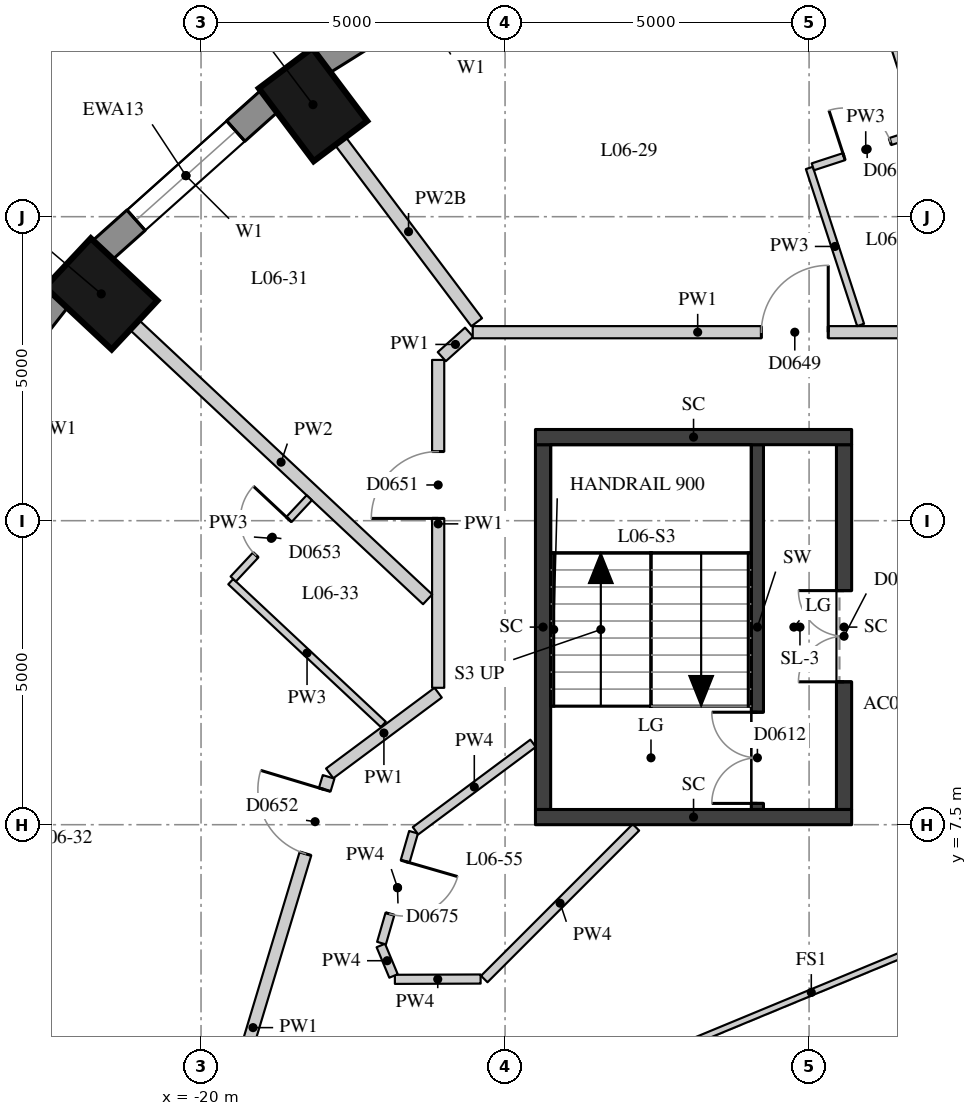
"""IFC4 building model, lengths in metres.
Left out: names, types, materials, properties, quantities, classifications, styles, units other than length and angle.
Written with IfcOpenShell. Run it as: python <this file> out.ifc"""

import sys

from ifc_helpers import new_model, si_unit, direction, frame, frame_2d, origin, origin_2d, place, context, subcontext, project, spatial, rectangle, extrude, element, fill, save


model = new_model("IFC4")
c1 = context("Model", 3, precision=1e-05, world=origin(), true_north=direction((0.0, 1.0)))
c2 = subcontext(c1, "Body", "Model", "MODEL_VIEW")
j1 = project(units=[si_unit("LENGTHUNIT", "METRE"), si_unit("PLANEANGLEUNIT", "RADIAN")], contexts=[c1])
p1 = place(None, origin())
s1 = spatial("IfcSite", under=j1, at=p1, CompositionType="ELEMENT")
p2 = place(p1, origin())
s2 = spatial("IfcBuilding", under=s1, at=p2, CompositionType="ELEMENT")
p3 = place(p2, frame((0.0, 0.0, 28.3)))
s3 = spatial("IfcBuildingStorey", under=s2, at=p3, CompositionType="ELEMENT", Elevation=28.3)
for number, where, z_axis, x_axis in (
    (1, (-18.159, 19.343, 0.0), (0.0, 0.0, 1.0), (-0.601, 0.799, 0.0)),
    (2, (-21.641, 16.23, 0.0), (0.0, 0.0, 1.0), (-0.73, 0.683, 0.0)),
):
    element("IfcColumn", number, at=place(p3, frame(where, z_axis=z_axis, x_axis=x_axis)), inside=s3, PredefinedType="COLUMN", context=c2, shape_type="SweptSolid", body=[
        extrude(rectangle(XDim=1.5, YDim=1.1, at=origin_2d()), origin(), (0.0, 0.0, 1.0), 3.3),
    ])
p4 = place(p3, frame((-14.817, 22.051, 0.0), z_axis=(0.0, 0.0, 1.0), x_axis=(-0.847635480093, -0.530579016629, 0.0)))
e3 = element("IfcWall", 3, at=p4, inside=s3, PredefinedType="SOLIDWALL", context=c2, shape_type="SweptSolid", body=[
    extrude(rectangle(XDim=3.782, YDim=0.45, at=frame_2d((1.891, 0.0))), origin(), (0.0, 0.0, 1.0), 3.02),
])
p5 = place(p4, frame((0.791, 0.0, 0.4)))
e4 = element("IfcOpeningElement", 4, at=p5, cuts=e3, PredefinedType="OPENING", context=c2, shape_type="SweptSolid", body=[
    extrude(rectangle(XDim=2.2, YDim=1.75, at=frame_2d((1.1, 0.875))), frame((0.0, 0.235, 0.0), z_axis=(0.0, -1.0, 0.0), x_axis=(1.0, 0.0, 0.0)), (0.0, 0.0, 1.0), 0.47),
])
p6 = place(p3, frame((-18.871, 19.407, 0.0), z_axis=(0.0, 0.0, 1.0), x_axis=(-0.745526233716, -0.66647628228, 0.0)))
e5 = element("IfcWall", 5, at=p6, inside=s3, PredefinedType="SOLIDWALL", context=c2, shape_type="SweptSolid", body=[
    extrude(rectangle(XDim=3.697, YDim=0.45, at=frame_2d((1.848, 0.0))), origin(), (0.0, 0.0, 1.0), 3.02),
])
p7 = place(p6, frame((0.749, 0.0, 0.4)))
e6 = element("IfcOpeningElement", 6, at=p7, cuts=e5, PredefinedType="OPENING", context=c2, shape_type="SweptSolid", body=[
    extrude(rectangle(XDim=2.2, YDim=1.75, at=frame_2d((1.1, 0.875))), frame((0.0, 0.235, 0.0), z_axis=(0.0, -1.0, 0.0), x_axis=(1.0, 0.0, 0.0)), (0.0, 0.0, 1.0), 0.47),
])
p8 = place(p3, frame((-22.352, 16.17, 0.0), z_axis=(0.0, 0.0, 1.0), x_axis=(-0.616661975264, -0.787228053529, 0.0)))
e7 = element("IfcWall", 7, at=p8, inside=s3, PredefinedType="SOLIDWALL", context=c2, shape_type="SweptSolid", body=[
    extrude(rectangle(XDim=3.61, YDim=0.45, at=frame_2d((1.805, 0.0))), origin(), (0.0, 0.0, 1.0), 3.02),
])
p9 = place(p8, frame((0.705, 0.0, 0.4)))
e8 = element("IfcOpeningElement", 8, at=p9, cuts=e7, PredefinedType="OPENING", context=c2, shape_type="SweptSolid", body=[
    extrude(rectangle(XDim=2.2, YDim=1.75, at=frame_2d((1.1, 0.875))), frame((0.0, 0.235, 0.0), z_axis=(0.0, -1.0, 0.0), x_axis=(1.0, 0.0, 0.0)), (0.0, 0.0, 1.0), 0.47),
])
p10 = place(p3, frame((-10.85, 7.75, 0.0), z_axis=(0.0, 0.0, 1.0), x_axis=(0.0, 1.0, 0.0)))
e9 = element("IfcWall", 9, at=p10, inside=s3, PredefinedType="SHEAR", context=c2, shape_type="SweptSolid", body=[
    extrude(rectangle(XDim=6.0, YDim=0.2, at=frame_2d((3.0, 0.0))), origin(), (0.0, 0.0, 1.0), 3.02),
])
p11 = place(p10, frame((0.1, 0.0, 0.0)))
e10 = element("IfcOpeningElement", 10, at=p11, cuts=e9, PredefinedType="OPENING", context=c2, shape_type="SweptSolid", body=[
    extrude(rectangle(XDim=1.5, YDim=2.1, at=frame_2d((0.75, 1.05))), frame((0.0, 0.11, 0.0), z_axis=(0.0, -1.0, 0.0), x_axis=(1.0, 0.0, 0.0)), (0.0, 0.0, 1.0), 0.22),
])
p12 = place(p3, frame((-14.375, 7.75, -0.28), z_axis=(0.0, 0.0, 1.0), x_axis=(0.0, 1.0, 0.0)))
e11 = element("IfcWall", 11, at=p12, inside=s3, PredefinedType="SHEAR", context=c2, shape_type="SweptSolid", body=[
    extrude(rectangle(XDim=6.0, YDim=0.25, at=frame_2d((3.0, 0.0))), origin(), (0.0, 0.0, 1.0), 3.3),
])
p13 = place(p3, frame((-9.425, 7.75, -0.28), z_axis=(0.0, 0.0, 1.0), x_axis=(0.0, 1.0, 0.0)))
e12 = element("IfcWall", 12, at=p13, inside=s3, PredefinedType="SHEAR", context=c2, shape_type="SweptSolid", body=[
    extrude(rectangle(XDim=6.0, YDim=0.25, at=frame_2d((3.0, 0.0))), origin(), (0.0, 0.0, 1.0), 3.3),
])
p14 = place(p13, frame((2.1, 0.0, 0.28)))
e13 = element("IfcOpeningElement", 13, at=p14, cuts=e12, PredefinedType="OPENING", context=c2, shape_type="SweptSolid", body=[
    extrude(rectangle(XDim=1.5, YDim=2.1, at=frame_2d((0.75, 1.05))), frame((0.0, 0.135, 0.0), z_axis=(0.0, -1.0, 0.0), x_axis=(1.0, 0.0, 0.0)), (0.0, 0.0, 1.0), 0.27),
])
for number, where, z_axis, x_axis in (
    (14, (-14.5, 13.875, -0.28), (0.0, 0.0, 1.0), (1.0, 0.0, 0.0)),
    (15, (-14.5, 7.625, -0.28), (0.0, 0.0, 1.0), (1.0, 0.0, 0.0)),
):
    element("IfcWall", number, at=place(p3, frame(where, z_axis=z_axis, x_axis=x_axis)), inside=s3, PredefinedType="SHEAR", context=c2, shape_type="SweptSolid", body=[
        extrude(rectangle(XDim=5.2, YDim=0.25, at=frame_2d((2.6, 0.0))), origin(), (0.0, 0.0, 1.0), 3.3),
    ])
p15 = place(p3, frame((-17.884, 8.344, 0.0), z_axis=(0.0, 0.0, 1.0), x_axis=(0.802260120548, 0.596974621721, 0.0)))
e16 = element("IfcWall", 16, at=p15, inside=s3, PredefinedType="PARTITIONING", context=c2, shape_type="SweptSolid", body=[
    extrude(rectangle(XDim=2.224, YDim=0.2, at=frame_2d((1.112, 0.0))), origin(), (0.0, 0.0, 1.0), 3.02),
])
p16 = place(p3, frame((-16.1, 9.751, 0.0), z_axis=(0.0, 0.0, 1.0), x_axis=(0.0, 1.0, 0.0)))
e17 = element("IfcWall", 17, at=p16, inside=s3, PredefinedType="PARTITIONING", context=c2, shape_type="SweptSolid", body=[
    extrude(rectangle(XDim=5.393, YDim=0.2, at=frame_2d((2.696, 0.0))), origin(), (0.0, 0.0, 1.0), 3.02),
])
p17 = place(p16, frame((2.786, 0.0, 0.0)))
e18 = element("IfcOpeningElement", 18, at=p17, cuts=e17, PredefinedType="OPENING", context=c2, shape_type="SweptSolid", body=[
    extrude(rectangle(XDim=1.1, YDim=2.1, at=frame_2d((0.55, 1.05))), frame((0.0, 0.11, 0.0), z_axis=(0.0, -1.0, 0.0), x_axis=(1.0, 0.0, 0.0)), (0.0, 0.0, 1.0), 0.22),
])
p18 = place(p3, frame((-16.041, 15.198, 0.0), z_axis=(0.0, 0.0, 1.0), x_axis=(0.744722115519, 0.667374685359, 0.0)))
e19 = element("IfcWall", 19, at=p18, inside=s3, PredefinedType="PARTITIONING", context=c2, shape_type="SweptSolid", body=[
    extrude(rectangle(XDim=0.603, YDim=0.2, at=frame_2d((0.301, 0.0))), origin(), (0.0, 0.0, 1.0), 3.02),
])
p19 = place(p3, frame((-15.531, 15.6, 0.0), z_axis=(0.0, 0.0, 1.0), x_axis=(1.0, 0.0, 0.0)))
e20 = element("IfcWall", 20, at=p19, inside=s3, PredefinedType="PARTITIONING", context=c2, shape_type="SweptSolid", body=[
    extrude(rectangle(XDim=7.399, YDim=0.2, at=frame_2d((3.699, 0.0))), origin(), (0.0, 0.0, 1.0), 3.02),
])
p20 = place(p19, frame((4.747, 0.0, 0.0)))
e21 = element("IfcOpeningElement", 21, at=p20, cuts=e20, PredefinedType="OPENING", context=c2, shape_type="SweptSolid", body=[
    extrude(rectangle(XDim=1.1, YDim=2.1, at=frame_2d((0.55, 1.05))), frame((0.0, 0.11, 0.0), z_axis=(0.0, -1.0, 0.0), x_axis=(1.0, 0.0, 0.0)), (0.0, 0.0, 1.0), 0.22),
])
p21 = place(p3, frame((-20.388, 0.038, 0.0), z_axis=(0.0, 0.0, 1.0), x_axis=(0.288600779805, 0.957449523419, 0.0)))
e22 = element("IfcWall", 22, at=p21, inside=s3, PredefinedType="PARTITIONING", context=c2, shape_type="SweptSolid", body=[
    extrude(rectangle(XDim=8.615, YDim=0.2, at=frame_2d((4.308, 0.0))), origin(), (0.0, 0.0, 1.0), 3.02),
])
p22 = place(p21, frame((7.295, 0.0, 0.0)))
e23 = element("IfcOpeningElement", 23, at=p22, cuts=e22, PredefinedType="OPENING", context=c2, shape_type="SweptSolid", body=[
    extrude(rectangle(XDim=1.1, YDim=2.1, at=frame_2d((0.55, 1.05))), frame((0.0, 0.11, 0.0), z_axis=(0.0, -1.0, 0.0), x_axis=(1.0, 0.0, 0.0)), (0.0, 0.0, 1.0), 0.22),
])
p23 = place(p21, frame((0.22, 0.0, 0.0)))
e24 = element("IfcOpeningElement", 24, at=p23, cuts=e22, PredefinedType="OPENING", context=c2, shape_type="SweptSolid", body=[
    extrude(rectangle(XDim=1.1, YDim=2.1, at=frame_2d((0.55, 1.05))), frame((0.0, 0.11, 0.0), z_axis=(0.0, -1.0, 0.0), x_axis=(1.0, 0.0, 0.0)), (0.0, 0.0, 1.0), 0.22),
])
p24 = place(p3, frame((-12.847, 7.456, 0.0), z_axis=(0.0, 0.0, 1.0), x_axis=(-0.707072180997, -0.707141379683, 0.0)))
e25 = element("IfcWall", 25, at=p24, inside=s3, PredefinedType="PARTITIONING", context=c2, shape_type="SweptSolid", body=[
    extrude(rectangle(XDim=3.528, YDim=0.15, at=frame_2d((1.764, 0.0))), origin(), (0.0, 0.0, 1.0), 3.02),
])
p25 = place(p3, frame((-15.402, 4.961, 0.0), z_axis=(0.0, 0.0, 1.0), x_axis=(-0.999994001087, -0.003463782477, 0.0)))
e26 = element("IfcWall", 26, at=p25, inside=s3, PredefinedType="PARTITIONING", context=c2, shape_type="SweptSolid", body=[
    extrude(rectangle(XDim=1.41, YDim=0.15, at=frame_2d((0.705, 0.0))), origin(), (0.0, 0.0, 1.0), 3.02),
])
p26 = place(p3, frame((-16.834, 5.012, 0.0), z_axis=(0.0, 0.0, 1.0), x_axis=(-0.384455737739, 0.923143426408, 0.0)))
e27 = element("IfcWall", 27, at=p26, inside=s3, PredefinedType="PARTITIONING", context=c2, shape_type="SweptSolid", body=[
    extrude(rectangle(XDim=0.543, YDim=0.15, at=frame_2d((0.271, 0.0))), origin(), (0.0, 0.0, 1.0), 3.02),
])
p27 = place(p3, frame((-17.032, 5.552, 0.0), z_axis=(0.0, 0.0, 1.0), x_axis=(0.277658349549, 0.96067988473, 0.0)))
e28 = element("IfcWall", 28, at=p27, inside=s3, PredefinedType="PARTITIONING", context=c2, shape_type="SweptSolid", body=[
    extrude(rectangle(XDim=1.898, YDim=0.15, at=frame_2d((0.949, 0.0))), origin(), (0.0, 0.0, 1.0), 3.02),
])
p28 = place(p27, frame((0.499, 0.0, 0.0)))
e29 = element("IfcOpeningElement", 29, at=p28, cuts=e28, PredefinedType="OPENING", context=c2, shape_type="SweptSolid", body=[
    extrude(rectangle(XDim=0.9, YDim=2.1, at=frame_2d((0.45, 1.05))), frame((0.0, 0.085, 0.0), z_axis=(0.0, -1.0, 0.0), x_axis=(1.0, 0.0, 0.0)), (0.0, 0.0, 1.0), 0.17),
])
p29 = place(p3, frame((-16.473, 7.4, 0.0), z_axis=(0.0, 0.0, 1.0), x_axis=(0.802267063429, 0.596965291233, 0.0)))
e30 = element("IfcWall", 30, at=p29, inside=s3, PredefinedType="PARTITIONING", context=c2, shape_type="SweptSolid", body=[
    extrude(rectangle(XDim=2.41, YDim=0.15, at=frame_2d((1.205, 0.0))), origin(), (0.0, 0.0, 1.0), 3.02),
])
p30 = place(p3, frame((-9.429, 23.014, 0.0), z_axis=(0.0, 0.0, 1.0), x_axis=(0.310239117306, -0.950658555998, 0.0)))
e31 = element("IfcWall", 31, at=p30, inside=s3, PredefinedType="PARTITIONING", context=c2, shape_type="SweptSolid", body=[
    extrude(rectangle(XDim=7.003, YDim=0.22, at=frame_2d((3.501, 0.0))), origin(), (0.0, 0.0, 1.0), 3.02),
])
p31 = place(p3, frame((-17.708, 18.743, 0.0), z_axis=(0.0, 0.0, 1.0), x_axis=(0.601172757903, -0.799119086967, 0.0)))
e32 = element("IfcWall", 32, at=p31, inside=s3, PredefinedType="PARTITIONING", context=c2, shape_type="SweptSolid", body=[
    extrude(rectangle(XDim=3.729, YDim=0.22, at=frame_2d((1.864, 0.0))), origin(), (0.0, 0.0, 1.0), 2.57),
])
p32 = place(p3, frame((-21.093, 15.718, 0.0), z_axis=(0.0, 0.0, 1.0), x_axis=(0.73009284205, -0.683347965525, 0.0)))
e33 = element("IfcWall", 33, at=p32, inside=s3, PredefinedType="PARTITIONING", context=c2, shape_type="SweptSolid", body=[
    extrude(rectangle(XDim=6.602, YDim=0.22, at=frame_2d((3.301, 0.0))), origin(), (0.0, 0.0, 1.0), 3.02),
])
p33 = place(p3, frame((-25.761, 3.964, 0.0), z_axis=(0.0, 0.0, 1.0), x_axis=(0.981209888948, -0.192943395406, 0.0)))
e34 = element("IfcWall", 34, at=p33, inside=s3, PredefinedType="PARTITIONING", context=c2, shape_type="SweptSolid", body=[
    extrude(rectangle(XDim=6.188, YDim=0.22, at=frame_2d((3.094, 0.0))), origin(), (0.0, 0.0, 1.0), 2.47),
])
p34 = place(p3, frame((-9.153, 15.719, 0.0), z_axis=(0.0, 0.0, 1.0), x_axis=(-0.310236037509, 0.950659561058, 0.0)))
e35 = element("IfcWall", 35, at=p34, inside=s3, PredefinedType="PARTITIONING", context=c2, shape_type="SweptSolid", body=[
    extrude(rectangle(XDim=2.717, YDim=0.12, at=frame_2d((1.358, 0.0))), origin(), (0.0, 0.0, 1.0), 3.02),
])
p35 = place(p3, frame((-17.002, 9.149, 0.0), z_axis=(0.0, 0.0, 1.0), x_axis=(-0.730093035944, 0.683347758368, 0.0)))
e36 = element("IfcWall", 36, at=p35, inside=s3, PredefinedType="PARTITIONING", context=c2, shape_type="SweptSolid", body=[
    extrude(rectangle(XDim=3.437, YDim=0.12, at=frame_2d((1.718, 0.0))), origin(), (0.0, 0.0, 1.0), 3.02),
])
p36 = place(p3, frame((-9.938, 18.32, 0.0), z_axis=(0.0, 0.0, 1.0), x_axis=(0.950678536911, 0.31017788357, 0.0)))
e37 = element("IfcWall", 37, at=p36, inside=s3, PredefinedType="PARTITIONING", context=c2, shape_type="SweptSolid", body=[
    extrude(rectangle(XDim=1.83, YDim=0.12, at=frame_2d((0.915, 0.0))), origin(), (0.0, 0.0, 1.0), 3.02),
])
p37 = place(p36, frame((0.54, 0.0, 0.0)))
e38 = element("IfcOpeningElement", 38, at=p37, cuts=e37, PredefinedType="OPENING", context=c2, shape_type="SweptSolid", body=[
    extrude(rectangle(XDim=0.8, YDim=2.1, at=frame_2d((0.4, 1.05))), frame((0.0, 0.07, 0.0), z_axis=(0.0, -1.0, 0.0), x_axis=(1.0, 0.0, 0.0)), (0.0, 0.0, 1.0), 0.14),
])
p38 = place(p3, frame((-19.47, 11.542, 0.0), z_axis=(0.0, 0.0, 1.0), x_axis=(0.683306289544, 0.730131847456, 0.0)))
e39 = element("IfcWall", 39, at=p38, inside=s3, PredefinedType="PARTITIONING", context=c2, shape_type="SweptSolid", body=[
    extrude(rectangle(XDim=1.83, YDim=0.12, at=frame_2d((0.915, 0.0))), origin(), (0.0, 0.0, 1.0), 3.02),
])
p39 = place(p38, frame((0.54, 0.0, 0.0)))
e40 = element("IfcOpeningElement", 40, at=p39, cuts=e39, PredefinedType="OPENING", context=c2, shape_type="SweptSolid", body=[
    extrude(rectangle(XDim=0.8, YDim=2.1, at=frame_2d((0.4, 1.05))), frame((0.0, 0.07, 0.0), z_axis=(0.0, -1.0, 0.0), x_axis=(1.0, 0.0, 0.0)), (0.0, 0.0, 1.0), 0.14),
])
p40 = place(p3, frame((-11.927, 3.927, 0.0), z_axis=(0.0, 0.0, 1.0), x_axis=(0.923860025149, 0.382730523909, 0.0)))
e41 = element("IfcWall", 41, at=p40, inside=s3, PredefinedType="PARTITIONING", context=c2, shape_type="SweptSolid", body=[
    extrude(rectangle(XDim=4.251, YDim=0.1, at=frame_2d((2.125, 0.0))), origin(), (0.0, 0.0, 1.0), 3.02),
])
p41 = place(p7, origin())
e42 = element("IfcWindow", 42, at=p41, inside=s3, PartitioningType="SINGLE_PANEL", PredefinedType="WINDOW", context=c2, shape_type="SweptSolid", body=[
    extrude(rectangle(XDim=2.2, YDim=1.75, at=frame_2d((1.1, 0.875))), frame((0.0, 0.035, 0.0), z_axis=(0.0, -1.0, 0.0), x_axis=(1.0, 0.0, 0.0)), (0.0, 0.0, 1.0), 0.06),
])
fill(e6, e42)
p42 = place(p11, origin())
e43 = element("IfcDoor", 43, at=p42, inside=s3, OperationType="DOUBLE_DOOR_SINGLE_SWING", PredefinedType="DOOR", context=c2, shape_type="SweptSolid", body=[
    extrude(rectangle(XDim=1.5, YDim=2.1, at=frame_2d((0.75, 1.05))), frame((0.0, 0.025, 0.0), z_axis=(0.0, -1.0, 0.0), x_axis=(1.0, 0.0, 0.0)), (0.0, 0.0, 1.0), 0.05),
])
fill(e10, e43)
p43 = place(p14, origin())
e44 = element("IfcDoor", 44, at=p43, inside=s3, OperationType="DOUBLE_DOOR_SINGLE_SWING", PredefinedType="DOOR", context=c2, shape_type="SweptSolid", body=[
    extrude(rectangle(XDim=1.5, YDim=2.1, at=frame_2d((0.75, 1.05))), frame((0.0, 0.025, 0.0), z_axis=(0.0, -1.0, 0.0), x_axis=(1.0, 0.0, 0.0)), (0.0, 0.0, 1.0), 0.05),
])
fill(e13, e44)
p44 = place(p20, origin())
e45 = element("IfcDoor", 45, at=p44, inside=s3, OperationType="SINGLE_SWING_RIGHT", PredefinedType="DOOR", context=c2, shape_type="SweptSolid", body=[
    extrude(rectangle(XDim=1.1, YDim=2.1, at=frame_2d((0.55, 1.05))), frame((0.0, 0.025, 0.0), z_axis=(0.0, -1.0, 0.0), x_axis=(1.0, 0.0, 0.0)), (0.0, 0.0, 1.0), 0.05),
])
fill(e21, e45)
p45 = place(p37, origin())
e46 = element("IfcDoor", 46, at=p45, inside=s3, OperationType="SINGLE_SWING_LEFT", PredefinedType="DOOR", context=c2, shape_type="SweptSolid", body=[
    extrude(rectangle(XDim=0.8, YDim=2.1, at=frame_2d((0.4, 1.05))), frame((0.0, 0.025, 0.0), z_axis=(0.0, -1.0, 0.0), x_axis=(1.0, 0.0, 0.0)), (0.0, 0.0, 1.0), 0.05),
])
fill(e38, e46)
p46 = place(p17, origin())
e47 = element("IfcDoor", 47, at=p46, inside=s3, OperationType="SINGLE_SWING_LEFT", PredefinedType="DOOR", context=c2, shape_type="SweptSolid", body=[
    extrude(rectangle(XDim=1.1, YDim=2.1, at=frame_2d((0.55, 1.05))), frame((0.0, 0.025, 0.0), z_axis=(0.0, -1.0, 0.0), x_axis=(1.0, 0.0, 0.0)), (0.0, 0.0, 1.0), 0.05),
])
fill(e18, e47)
p47 = place(p22, origin())
e48 = element("IfcDoor", 48, at=p47, inside=s3, OperationType="SINGLE_SWING_RIGHT", PredefinedType="DOOR", context=c2, shape_type="SweptSolid", body=[
    extrude(rectangle(XDim=1.1, YDim=2.1, at=frame_2d((0.55, 1.05))), frame((0.0, 0.025, 0.0), z_axis=(0.0, -1.0, 0.0), x_axis=(1.0, 0.0, 0.0)), (0.0, 0.0, 1.0), 0.05),
])
fill(e23, e48)
p48 = place(p39, origin())
e49 = element("IfcDoor", 49, at=p48, inside=s3, OperationType="SINGLE_SWING_RIGHT", PredefinedType="DOOR", context=c2, shape_type="SweptSolid", body=[
    extrude(rectangle(XDim=0.8, YDim=2.1, at=frame_2d((0.4, 1.05))), frame((0.0, 0.025, 0.0), z_axis=(0.0, -1.0, 0.0), x_axis=(1.0, 0.0, 0.0)), (0.0, 0.0, 1.0), 0.05),
])
fill(e40, e49)
p49 = place(p28, origin())
e50 = element("IfcDoor", 50, at=p49, inside=s3, OperationType="SINGLE_SWING_LEFT", PredefinedType="DOOR", context=c2, shape_type="SweptSolid", body=[
    extrude(rectangle(XDim=0.9, YDim=2.1, at=frame_2d((0.45, 1.05))), frame((0.0, 0.025, 0.0), z_axis=(0.0, -1.0, 0.0), x_axis=(1.0, 0.0, 0.0)), (0.0, 0.0, 1.0), 0.05),
])
fill(e29, e50)
save(model, sys.argv[1])
